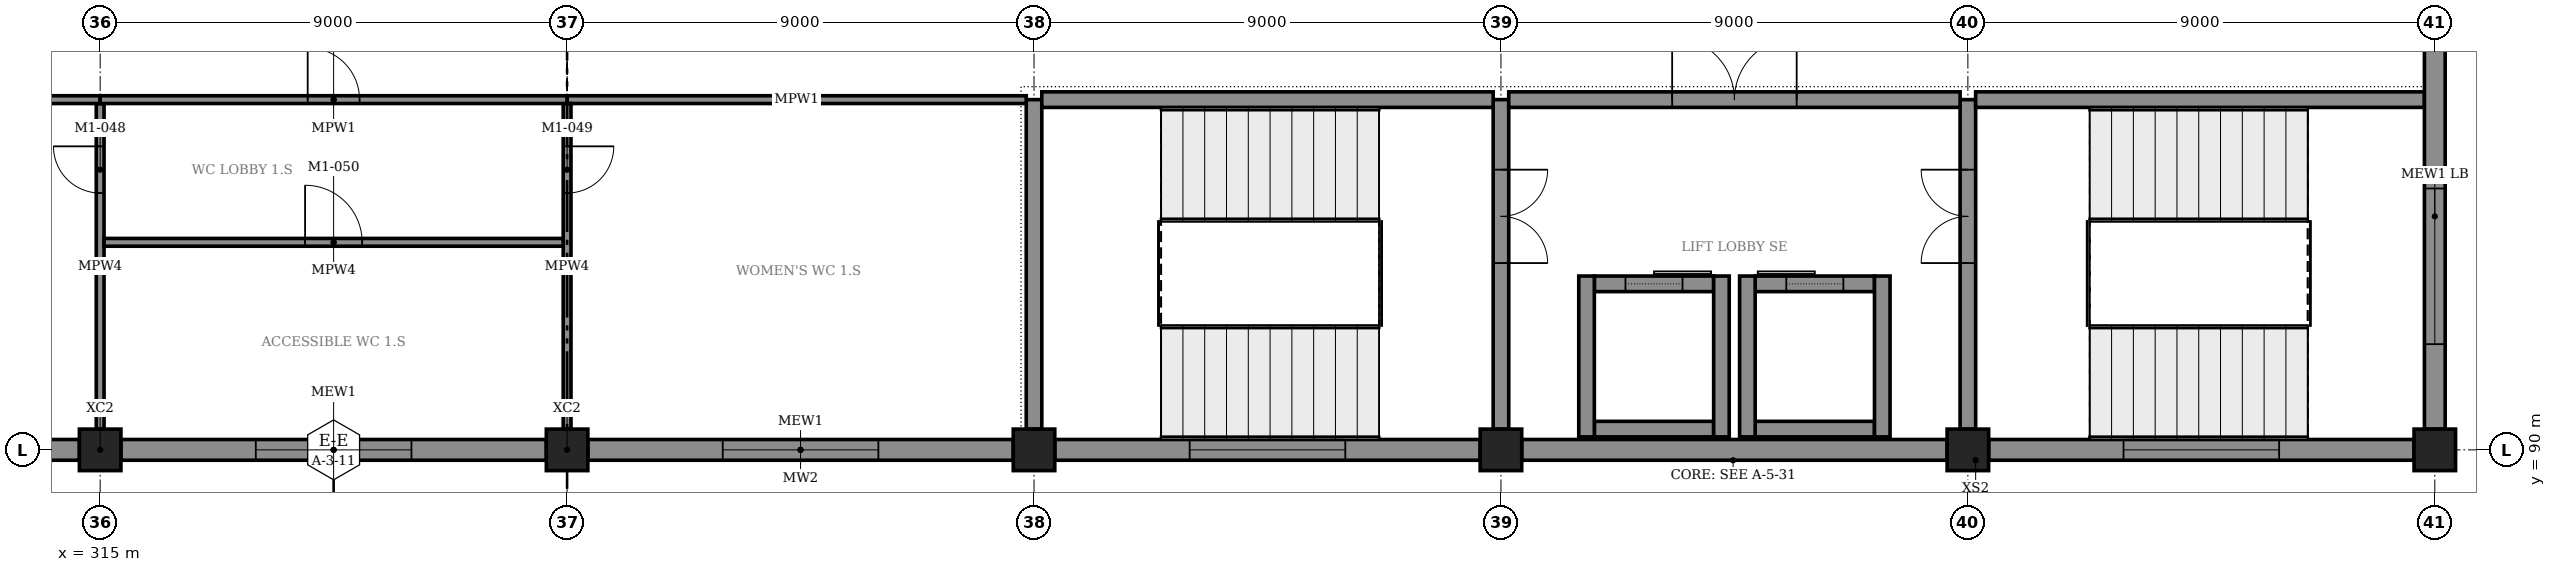
"""IFC4 building model, lengths in metres.
Left out: names, types, materials, properties, quantities, classifications, styles, units other than length and angle.
Written with IfcOpenShell. Run it as: python <this file> out.ifc"""

import sys

from ifc_helpers import new_model, si_unit, direction, frame, frame_2d, origin, origin_2d, place, context, subcontext, project, spatial, rectangle, extrude, element, fill, save


model = new_model("IFC4")
c1 = context("Model", 3, precision=1e-05, world=origin(), true_north=direction((0.0, 1.0)))
c2 = subcontext(c1, "Body", "Model", "MODEL_VIEW")
j1 = project(units=[si_unit("LENGTHUNIT", "METRE"), si_unit("PLANEANGLEUNIT", "RADIAN")], contexts=[c1])
p1 = place(None, origin())
s1 = spatial("IfcSite", under=j1, at=p1, CompositionType="ELEMENT")
p2 = place(p1, origin())
s2 = spatial("IfcBuilding", under=s1, at=p2, CompositionType="ELEMENT")
p3 = place(p2, frame((0.0, 0.0, 6.0)))
s3 = spatial("IfcBuildingStorey", under=s2, at=p3, CompositionType="ELEMENT", Elevation=6.0)
for number, where, z_axis, x_axis in (
    (1, (315.0, 90.0, 0.0), (0.0, 0.0, 1.0), (1.0, 0.0, 0.0)),
    (2, (324.0, 90.0, 0.0), (0.0, 0.0, 1.0), (1.0, 0.0, 0.0)),
    (3, (333.0, 90.0, 0.0), (0.0, 0.0, 1.0), (1.0, 0.0, 0.0)),
    (4, (342.0, 90.0, 0.0), (0.0, 0.0, 1.0), (1.0, 0.0, 0.0)),
    (5, (351.0, 90.0, 0.0), (0.0, 0.0, 1.0), (1.0, 0.0, 0.0)),
    (6, (360.0, 90.0, 0.0), (0.0, 0.0, 1.0), (1.0, 0.0, 0.0)),
):
    element("IfcColumn", number, at=place(p3, frame(where, z_axis=z_axis, x_axis=x_axis)), inside=s3, PredefinedType="COLUMN", context=c2, shape_type="SweptSolid", body=[
        extrude(rectangle(XDim=0.8, YDim=0.8, at=origin_2d()), origin(), (0.0, 0.0, 1.0), 5.5),
    ])
p4 = place(p3, frame((306.4, 90.0, 0.0), z_axis=(0.0, 0.0, 1.0), x_axis=(1.0, 0.0, 0.0)))
e7 = element("IfcWall", 7, at=p4, inside=s3, PredefinedType="STANDARD", context=c2, shape_type="SweptSolid", body=[
    extrude(rectangle(XDim=8.2, YDim=0.4, at=frame_2d((4.1, 0.0))), origin(), (0.0, 0.0, 1.0), 4.32),
])
p5 = place(p4, frame((2.6, 0.0, 0.9)))
e8 = element("IfcOpeningElement", 8, at=p5, cuts=e7, PredefinedType="OPENING", context=c2, shape_type="SweptSolid", body=[
    extrude(rectangle(XDim=3.0, YDim=2.1, at=frame_2d((1.5, 1.05))), frame((0.0, 0.21, 0.0), z_axis=(0.0, -1.0, 0.0), x_axis=(1.0, 0.0, 0.0)), (0.0, 0.0, 1.0), 0.42),
])
p6 = place(p3, frame((315.4, 90.0, 0.0), z_axis=(0.0, 0.0, 1.0), x_axis=(1.0, 0.0, 0.0)))
e9 = element("IfcWall", 9, at=p6, inside=s3, PredefinedType="STANDARD", context=c2, shape_type="SweptSolid", body=[
    extrude(rectangle(XDim=8.2, YDim=0.4, at=frame_2d((4.1, 0.0))), origin(), (0.0, 0.0, 1.0), 4.32),
])
p7 = place(p6, frame((2.6, 0.0, 0.9)))
e10 = element("IfcOpeningElement", 10, at=p7, cuts=e9, PredefinedType="OPENING", context=c2, shape_type="SweptSolid", body=[
    extrude(rectangle(XDim=3.0, YDim=2.1, at=frame_2d((1.5, 1.05))), frame((0.0, 0.21, 0.0), z_axis=(0.0, -1.0, 0.0), x_axis=(1.0, 0.0, 0.0)), (0.0, 0.0, 1.0), 0.42),
])
p8 = place(p3, frame((324.4, 90.0, 0.0), z_axis=(0.0, 0.0, 1.0), x_axis=(1.0, 0.0, 0.0)))
e11 = element("IfcWall", 11, at=p8, inside=s3, PredefinedType="STANDARD", context=c2, shape_type="SweptSolid", body=[
    extrude(rectangle(XDim=8.2, YDim=0.4, at=frame_2d((4.1, 0.0))), origin(), (0.0, 0.0, 1.0), 4.32),
])
p9 = place(p8, frame((2.6, 0.0, 0.9)))
e12 = element("IfcOpeningElement", 12, at=p9, cuts=e11, PredefinedType="OPENING", context=c2, shape_type="SweptSolid", body=[
    extrude(rectangle(XDim=3.0, YDim=2.1, at=frame_2d((1.5, 1.05))), frame((0.0, 0.21, 0.0), z_axis=(0.0, -1.0, 0.0), x_axis=(1.0, 0.0, 0.0)), (0.0, 0.0, 1.0), 0.42),
])
p10 = place(p3, frame((333.4, 90.0, 0.0), z_axis=(0.0, 0.0, 1.0), x_axis=(1.0, 0.0, 0.0)))
e13 = element("IfcWall", 13, at=p10, inside=s3, PredefinedType="STANDARD", context=c2, shape_type="SweptSolid", body=[
    extrude(rectangle(XDim=8.2, YDim=0.4, at=frame_2d((4.1, 0.0))), origin(), (0.0, 0.0, 1.0), 4.32),
])
p11 = place(p10, frame((2.6, 0.0, 0.9)))
e14 = element("IfcOpeningElement", 14, at=p11, cuts=e13, PredefinedType="OPENING", context=c2, shape_type="SweptSolid", body=[
    extrude(rectangle(XDim=3.0, YDim=2.1, at=frame_2d((1.5, 1.05))), frame((0.0, 0.21, 0.0), z_axis=(0.0, -1.0, 0.0), x_axis=(1.0, 0.0, 0.0)), (0.0, 0.0, 1.0), 0.42),
])
p12 = place(p3, frame((342.4, 90.0, 0.0), z_axis=(0.0, 0.0, 1.0), x_axis=(1.0, 0.0, 0.0)))
e15 = element("IfcWall", 15, at=p12, inside=s3, PredefinedType="STANDARD", context=c2, shape_type="SweptSolid", body=[
    extrude(rectangle(XDim=8.2, YDim=0.4, at=frame_2d((4.1, 0.0))), origin(), (0.0, 0.0, 1.0), 4.32),
])
p13 = place(p3, frame((351.4, 90.0, 0.0), z_axis=(0.0, 0.0, 1.0), x_axis=(1.0, 0.0, 0.0)))
e16 = element("IfcWall", 16, at=p13, inside=s3, PredefinedType="STANDARD", context=c2, shape_type="SweptSolid", body=[
    extrude(rectangle(XDim=8.2, YDim=0.4, at=frame_2d((4.1, 0.0))), origin(), (0.0, 0.0, 1.0), 4.32),
])
p14 = place(p13, frame((2.6, 0.0, 0.9)))
e17 = element("IfcOpeningElement", 17, at=p14, cuts=e16, PredefinedType="OPENING", context=c2, shape_type="SweptSolid", body=[
    extrude(rectangle(XDim=3.0, YDim=2.1, at=frame_2d((1.5, 1.05))), frame((0.0, 0.21, 0.0), z_axis=(0.0, -1.0, 0.0), x_axis=(1.0, 0.0, 0.0)), (0.0, 0.0, 1.0), 0.42),
])
p15 = place(p3, frame((360.0, 90.4, 0.0), z_axis=(0.0, 0.0, 1.0), x_axis=(0.0, 1.0, 0.0)))
e18 = element("IfcWall", 18, at=p15, inside=s3, PredefinedType="STANDARD", context=c2, shape_type="SweptSolid", body=[
    extrude(rectangle(XDim=8.2, YDim=0.4, at=frame_2d((4.1, 0.0))), origin(), (0.0, 0.0, 1.0), 4.32),
])
p16 = place(p15, frame((1.638, 0.0, 0.9)))
e19 = element("IfcOpeningElement", 19, at=p16, cuts=e18, PredefinedType="OPENING", context=c2, shape_type="SweptSolid", body=[
    extrude(rectangle(XDim=3.0, YDim=2.1, at=frame_2d((1.5, 1.05))), frame((0.0, 0.21, 0.0), z_axis=(0.0, -1.0, 0.0), x_axis=(1.0, 0.0, 0.0)), (0.0, 0.0, 1.0), 0.42),
])
p17 = place(p3, frame((351.0, 90.4, 0.0), z_axis=(0.0, 0.0, 1.0), x_axis=(0.0, 1.0, 0.0)))
e20 = element("IfcWall", 20, at=p17, inside=s3, PredefinedType="SHEAR", context=c2, shape_type="SweptSolid", body=[
    extrude(rectangle(XDim=6.35, YDim=0.3, at=frame_2d((3.175, 0.0))), origin(), (0.0, 0.0, 1.0), 5.22),
])
p18 = place(p17, frame((3.2, 0.0, 0.0)))
e21 = element("IfcOpeningElement", 21, at=p18, cuts=e20, PredefinedType="OPENING", context=c2, shape_type="SweptSolid", body=[
    extrude(rectangle(XDim=1.8, YDim=2.4, at=frame_2d((0.9, 1.2))), frame((0.0, 0.16, 0.0), z_axis=(0.0, -1.0, 0.0), x_axis=(1.0, 0.0, 0.0)), (0.0, 0.0, 1.0), 0.32),
])
p19 = place(p3, frame((342.0, 90.4, 0.0), z_axis=(0.0, 0.0, 1.0), x_axis=(0.0, 1.0, 0.0)))
e22 = element("IfcWall", 22, at=p19, inside=s3, PredefinedType="SHEAR", context=c2, shape_type="SweptSolid", body=[
    extrude(rectangle(XDim=6.35, YDim=0.3, at=frame_2d((3.175, 0.0))), origin(), (0.0, 0.0, 1.0), 5.22),
])
p20 = place(p19, frame((3.2, 0.0, 0.0)))
e23 = element("IfcOpeningElement", 23, at=p20, cuts=e22, PredefinedType="OPENING", context=c2, shape_type="SweptSolid", body=[
    extrude(rectangle(XDim=1.8, YDim=2.4, at=frame_2d((0.9, 1.2))), frame((0.0, 0.16, 0.0), z_axis=(0.0, -1.0, 0.0), x_axis=(1.0, 0.0, 0.0)), (0.0, 0.0, 1.0), 0.32),
])
p21 = place(p3, frame((333.0, 90.4, 0.0), z_axis=(0.0, 0.0, 1.0), x_axis=(0.0, 1.0, 0.0)))
e24 = element("IfcWall", 24, at=p21, inside=s3, PredefinedType="SHEAR", context=c2, shape_type="SweptSolid", body=[
    extrude(rectangle(XDim=6.35, YDim=0.3, at=frame_2d((3.175, 0.0))), origin(), (0.0, 0.0, 1.0), 5.22),
])
p22 = place(p3, frame((333.15, 96.75, 0.0), z_axis=(0.0, 0.0, 1.0), x_axis=(1.0, 0.0, 0.0)))
e25 = element("IfcWall", 25, at=p22, inside=s3, PredefinedType="SHEAR", context=c2, shape_type="SweptSolid", body=[
    extrude(rectangle(XDim=8.7, YDim=0.3, at=frame_2d((4.35, 0.0))), origin(), (0.0, 0.0, 1.0), 5.22),
])
p23 = place(p3, frame((342.15, 96.75, 0.0), z_axis=(0.0, 0.0, 1.0), x_axis=(1.0, 0.0, 0.0)))
e26 = element("IfcWall", 26, at=p23, inside=s3, PredefinedType="SHEAR", context=c2, shape_type="SweptSolid", body=[
    extrude(rectangle(XDim=8.7, YDim=0.3, at=frame_2d((4.35, 0.0))), origin(), (0.0, 0.0, 1.0), 5.22),
])
p24 = place(p23, frame((3.15, 0.0, 0.0)))
e27 = element("IfcOpeningElement", 27, at=p24, cuts=e26, PredefinedType="OPENING", context=c2, shape_type="SweptSolid", body=[
    extrude(rectangle(XDim=2.4, YDim=2.4, at=frame_2d((1.2, 1.2))), frame((0.0, 0.16, 0.0), z_axis=(0.0, -1.0, 0.0), x_axis=(1.0, 0.0, 0.0)), (0.0, 0.0, 1.0), 0.32),
])
p25 = place(p3, frame((351.15, 96.75, 0.0), z_axis=(0.0, 0.0, 1.0), x_axis=(1.0, 0.0, 0.0)))
e28 = element("IfcWall", 28, at=p25, inside=s3, PredefinedType="SHEAR", context=c2, shape_type="SweptSolid", body=[
    extrude(rectangle(XDim=8.65, YDim=0.3, at=frame_2d((4.325, 0.0))), origin(), (0.0, 0.0, 1.0), 5.22),
])
for number, where, z_axis, x_axis in (
    (29, (349.35, 90.25, 0.0), (0.0, 0.0, 1.0), (0.0, 1.0, 0.0)),
    (30, (346.75, 90.25, 0.0), (0.0, 0.0, 1.0), (0.0, 1.0, 0.0)),
):
    element("IfcWall", number, at=place(p3, frame(where, z_axis=z_axis, x_axis=x_axis)), inside=s3, PredefinedType="SHEAR", context=c2, shape_type="SweptSolid", body=[
        extrude(rectangle(XDim=3.1, YDim=0.3, at=frame_2d((1.55, 0.0))), origin(), (0.0, 0.0, 1.0), 5.5),
    ])
p26 = place(p3, frame((346.9, 90.4, 0.0), z_axis=(0.0, 0.0, 1.0), x_axis=(1.0, 0.0, 0.0)))
e31 = element("IfcWall", 31, at=p26, inside=s3, PredefinedType="SHEAR", context=c2, shape_type="SweptSolid", body=[
    extrude(rectangle(XDim=2.3, YDim=0.3, at=frame_2d((1.15, 0.0))), origin(), (0.0, 0.0, 1.0), 5.5),
])
p27 = place(p3, frame((346.9, 93.2, 0.0), z_axis=(0.0, 0.0, 1.0), x_axis=(1.0, 0.0, 0.0)))
e32 = element("IfcWall", 32, at=p27, inside=s3, PredefinedType="SHEAR", context=c2, shape_type="SweptSolid", body=[
    extrude(rectangle(XDim=2.3, YDim=0.3, at=frame_2d((1.15, 0.0))), origin(), (0.0, 0.0, 1.0), 5.5),
])
p28 = place(p27, frame((0.6, 0.0, 0.0)))
e33 = element("IfcOpeningElement", 33, at=p28, cuts=e32, PredefinedType="OPENING", context=c2, shape_type="SweptSolid", body=[
    extrude(rectangle(XDim=1.1, YDim=2.2, at=frame_2d((0.55, 1.1))), frame((0.0, 0.16, 0.0), z_axis=(0.0, -1.0, 0.0), x_axis=(1.0, 0.0, 0.0)), (0.0, 0.0, 1.0), 0.32),
])
for number, where, z_axis, x_axis in (
    (34, (346.25, 90.25, 0.0), (0.0, 0.0, 1.0), (0.0, 1.0, 0.0)),
    (35, (343.65, 90.25, 0.0), (0.0, 0.0, 1.0), (0.0, 1.0, 0.0)),
):
    element("IfcWall", number, at=place(p3, frame(where, z_axis=z_axis, x_axis=x_axis)), inside=s3, PredefinedType="SHEAR", context=c2, shape_type="SweptSolid", body=[
        extrude(rectangle(XDim=3.1, YDim=0.3, at=frame_2d((1.55, 0.0))), origin(), (0.0, 0.0, 1.0), 5.5),
    ])
p29 = place(p3, frame((343.8, 90.4, 0.0), z_axis=(0.0, 0.0, 1.0), x_axis=(1.0, 0.0, 0.0)))
e36 = element("IfcWall", 36, at=p29, inside=s3, PredefinedType="SHEAR", context=c2, shape_type="SweptSolid", body=[
    extrude(rectangle(XDim=2.3, YDim=0.3, at=frame_2d((1.15, 0.0))), origin(), (0.0, 0.0, 1.0), 5.5),
])
p30 = place(p3, frame((343.8, 93.2, 0.0), z_axis=(0.0, 0.0, 1.0), x_axis=(1.0, 0.0, 0.0)))
e37 = element("IfcWall", 37, at=p30, inside=s3, PredefinedType="SHEAR", context=c2, shape_type="SweptSolid", body=[
    extrude(rectangle(XDim=2.3, YDim=0.3, at=frame_2d((1.15, 0.0))), origin(), (0.0, 0.0, 1.0), 5.5),
])
p31 = place(p30, frame((0.6, 0.0, 0.0)))
e38 = element("IfcOpeningElement", 38, at=p31, cuts=e37, PredefinedType="OPENING", context=c2, shape_type="SweptSolid", body=[
    extrude(rectangle(XDim=1.1, YDim=2.2, at=frame_2d((0.55, 1.1))), frame((0.0, 0.16, 0.0), z_axis=(0.0, -1.0, 0.0), x_axis=(1.0, 0.0, 0.0)), (0.0, 0.0, 1.0), 0.32),
])
p32 = place(p3, frame((306.15, 96.75, 0.0), z_axis=(0.0, 0.0, 1.0), x_axis=(1.0, 0.0, 0.0)))
e39 = element("IfcWall", 39, at=p32, inside=s3, PredefinedType="PARTITIONING", context=c2, shape_type="SweptSolid", body=[
    extrude(rectangle(XDim=8.85, YDim=0.15, at=frame_2d((4.425, 0.0))), origin(), (0.0, 0.0, 1.0), 4.32),
])
p33 = place(p3, frame((315.0, 90.4, 0.0), z_axis=(0.0, 0.0, 1.0), x_axis=(0.0, 1.0, 0.0)))
e40 = element("IfcWall", 40, at=p33, inside=s3, PredefinedType="PARTITIONING", context=c2, shape_type="SweptSolid", body=[
    extrude(rectangle(XDim=6.275, YDim=0.15, at=frame_2d((3.138, 0.0))), origin(), (0.0, 0.0, 1.0), 4.32),
])
p34 = place(p33, frame((4.55, 0.0, 0.0)))
e41 = element("IfcOpeningElement", 41, at=p34, cuts=e40, PredefinedType="OPENING", context=c2, shape_type="SweptSolid", body=[
    extrude(rectangle(XDim=0.9, YDim=2.1, at=frame_2d((0.45, 1.05))), frame((0.0, 0.085, 0.0), z_axis=(0.0, -1.0, 0.0), x_axis=(1.0, 0.0, 0.0)), (0.0, 0.0, 1.0), 0.17),
])
p35 = place(p3, frame((324.0, 96.75, 0.0), z_axis=(0.0, 0.0, 1.0), x_axis=(1.0, 0.0, 0.0)))
e42 = element("IfcWall", 42, at=p35, inside=s3, PredefinedType="PARTITIONING", context=c2, shape_type="SweptSolid", body=[
    extrude(rectangle(XDim=8.85, YDim=0.15, at=frame_2d((4.425, 0.0))), origin(), (0.0, 0.0, 1.0), 4.32),
])
p36 = place(p3, frame((324.0, 90.4, 0.0), z_axis=(0.0, 0.0, 1.0), x_axis=(0.0, 1.0, 0.0)))
e43 = element("IfcWall", 43, at=p36, inside=s3, PredefinedType="PARTITIONING", context=c2, shape_type="SweptSolid", body=[
    extrude(rectangle(XDim=6.275, YDim=0.15, at=frame_2d((3.138, 0.0))), origin(), (0.0, 0.0, 1.0), 4.32),
])
p37 = place(p36, frame((4.55, 0.0, 0.0)))
e44 = element("IfcOpeningElement", 44, at=p37, cuts=e43, PredefinedType="OPENING", context=c2, shape_type="SweptSolid", body=[
    extrude(rectangle(XDim=0.9, YDim=2.1, at=frame_2d((0.45, 1.05))), frame((0.0, 0.085, 0.0), z_axis=(0.0, -1.0, 0.0), x_axis=(1.0, 0.0, 0.0)), (0.0, 0.0, 1.0), 0.17),
])
p38 = place(p3, frame((315.075, 94.0, 0.0), z_axis=(0.0, 0.0, 1.0), x_axis=(1.0, 0.0, 0.0)))
e45 = element("IfcWall", 45, at=p38, inside=s3, PredefinedType="PARTITIONING", context=c2, shape_type="SweptSolid", body=[
    extrude(rectangle(XDim=8.85, YDim=0.15, at=frame_2d((4.425, 0.0))), origin(), (0.0, 0.0, 1.0), 4.32),
])
p39 = place(p38, frame((3.875, 0.0, 0.0)))
e46 = element("IfcOpeningElement", 46, at=p39, cuts=e45, PredefinedType="OPENING", context=c2, shape_type="SweptSolid", body=[
    extrude(rectangle(XDim=1.1, YDim=2.1, at=frame_2d((0.55, 1.05))), frame((0.0, 0.085, 0.0), z_axis=(0.0, -1.0, 0.0), x_axis=(1.0, 0.0, 0.0)), (0.0, 0.0, 1.0), 0.17),
])
p40 = place(p3, frame((315.0, 96.75, 0.0), z_axis=(0.0, 0.0, 1.0), x_axis=(1.0, 0.0, 0.0)))
e47 = element("IfcWall", 47, at=p40, inside=s3, PredefinedType="PARTITIONING", context=c2, shape_type="SweptSolid", body=[
    extrude(rectangle(XDim=9.0, YDim=0.15, at=frame_2d((4.5, 0.0))), origin(), (0.0, 0.0, 1.0), 4.32),
])
p41 = place(p40, frame((4.0, 0.0, 0.0)))
e48 = element("IfcOpeningElement", 48, at=p41, cuts=e47, PredefinedType="OPENING", context=c2, shape_type="SweptSolid", body=[
    extrude(rectangle(XDim=1.0, YDim=2.4, at=frame_2d((0.5, 1.2))), frame((0.0, 0.085, 0.0), z_axis=(0.0, -1.0, 0.0), x_axis=(1.0, 0.0, 0.0)), (0.0, 0.0, 1.0), 0.17),
])
p42 = place(p7, origin())
e49 = element("IfcWindow", 49, at=p42, inside=s3, PartitioningType="TRIPLE_PANEL_VERTICAL", PredefinedType="WINDOW", context=c2, shape_type="SweptSolid", body=[
    extrude(rectangle(XDim=3.0, YDim=2.1, at=frame_2d((1.5, 1.05))), frame((0.0, 0.03, 0.0), z_axis=(0.0, -1.0, 0.0), x_axis=(1.0, 0.0, 0.0)), (0.0, 0.0, 1.0), 0.06),
])
fill(e10, e49)
p43 = place(p9, origin())
e50 = element("IfcWindow", 50, at=p43, inside=s3, PartitioningType="TRIPLE_PANEL_VERTICAL", PredefinedType="WINDOW", context=c2, shape_type="SweptSolid", body=[
    extrude(rectangle(XDim=3.0, YDim=2.1, at=frame_2d((1.5, 1.05))), frame((0.0, 0.03, 0.0), z_axis=(0.0, -1.0, 0.0), x_axis=(1.0, 0.0, 0.0)), (0.0, 0.0, 1.0), 0.06),
])
fill(e12, e50)
p44 = place(p11, origin())
e51 = element("IfcWindow", 51, at=p44, inside=s3, PartitioningType="TRIPLE_PANEL_VERTICAL", PredefinedType="WINDOW", context=c2, shape_type="SweptSolid", body=[
    extrude(rectangle(XDim=3.0, YDim=2.1, at=frame_2d((1.5, 1.05))), frame((0.0, 0.03, 0.0), z_axis=(0.0, -1.0, 0.0), x_axis=(1.0, 0.0, 0.0)), (0.0, 0.0, 1.0), 0.06),
])
fill(e14, e51)
p45 = place(p14, origin())
e52 = element("IfcWindow", 52, at=p45, inside=s3, PartitioningType="TRIPLE_PANEL_VERTICAL", PredefinedType="WINDOW", context=c2, shape_type="SweptSolid", body=[
    extrude(rectangle(XDim=3.0, YDim=2.1, at=frame_2d((1.5, 1.05))), frame((0.0, 0.03, 0.0), z_axis=(0.0, -1.0, 0.0), x_axis=(1.0, 0.0, 0.0)), (0.0, 0.0, 1.0), 0.06),
])
fill(e17, e52)
p46 = place(p16, origin())
e53 = element("IfcWindow", 53, at=p46, inside=s3, PartitioningType="TRIPLE_PANEL_VERTICAL", PredefinedType="WINDOW", context=c2, shape_type="SweptSolid", body=[
    extrude(rectangle(XDim=3.0, YDim=2.1, at=frame_2d((1.5, 1.05))), frame((0.0, 0.03, 0.0), z_axis=(0.0, -1.0, 0.0), x_axis=(1.0, 0.0, 0.0)), (0.0, 0.0, 1.0), 0.06),
])
fill(e19, e53)
p47 = place(p18, origin())
e54 = element("IfcDoor", 54, at=p47, inside=s3, OperationType="DOUBLE_DOOR_SINGLE_SWING", PredefinedType="DOOR", context=c2, shape_type="SweptSolid", body=[
    extrude(rectangle(XDim=1.8, YDim=2.4, at=frame_2d((0.9, 1.2))), frame((0.0, 0.025, 0.0), z_axis=(0.0, -1.0, 0.0), x_axis=(1.0, 0.0, 0.0)), (0.0, 0.0, 1.0), 0.05),
])
fill(e21, e54)
p48 = place(p20, frame((1.8, 0.0, 0.0), z_axis=(0.0, 0.0, 1.0), x_axis=(-1.0, 0.0, 0.0)))
e55 = element("IfcDoor", 55, at=p48, inside=s3, OperationType="DOUBLE_DOOR_SINGLE_SWING", PredefinedType="DOOR", context=c2, shape_type="SweptSolid", body=[
    extrude(rectangle(XDim=1.8, YDim=2.4, at=frame_2d((0.9, 1.2))), frame((0.0, 0.025, 0.0), z_axis=(0.0, -1.0, 0.0), x_axis=(1.0, 0.0, 0.0)), (0.0, 0.0, 1.0), 0.05),
])
fill(e23, e55)
p49 = place(p24, origin())
e56 = element("IfcDoor", 56, at=p49, inside=s3, OperationType="DOUBLE_DOOR_SINGLE_SWING", PredefinedType="DOOR", context=c2, shape_type="SweptSolid", body=[
    extrude(rectangle(XDim=2.4, YDim=2.4, at=frame_2d((1.2, 1.2))), frame((0.0, 0.025, 0.0), z_axis=(0.0, -1.0, 0.0), x_axis=(1.0, 0.0, 0.0)), (0.0, 0.0, 1.0), 0.05),
])
fill(e27, e56)
p50 = place(p28, origin())
e57 = element("IfcDoor", 57, at=p50, inside=s3, OperationType="SLIDING_TO_LEFT", PredefinedType="DOOR", context=c2, shape_type="SweptSolid", body=[
    extrude(rectangle(XDim=1.1, YDim=2.2, at=frame_2d((0.55, 1.1))), frame((0.0, 0.025, 0.0), z_axis=(0.0, -1.0, 0.0), x_axis=(1.0, 0.0, 0.0)), (0.0, 0.0, 1.0), 0.05),
])
fill(e33, e57)
p51 = place(p31, origin())
e58 = element("IfcDoor", 58, at=p51, inside=s3, OperationType="SLIDING_TO_RIGHT", PredefinedType="DOOR", context=c2, shape_type="SweptSolid", body=[
    extrude(rectangle(XDim=1.1, YDim=2.2, at=frame_2d((0.55, 1.1))), frame((0.0, 0.025, 0.0), z_axis=(0.0, -1.0, 0.0), x_axis=(1.0, 0.0, 0.0)), (0.0, 0.0, 1.0), 0.05),
])
fill(e38, e58)
p52 = place(p34, origin())
e59 = element("IfcDoor", 59, at=p52, inside=s3, OperationType="SINGLE_SWING_RIGHT", PredefinedType="DOOR", context=c2, shape_type="SweptSolid", body=[
    extrude(rectangle(XDim=0.9, YDim=2.1, at=frame_2d((0.45, 1.05))), frame((0.0, 0.025, 0.0), z_axis=(0.0, -1.0, 0.0), x_axis=(1.0, 0.0, 0.0)), (0.0, 0.0, 1.0), 0.05),
])
fill(e41, e59)
p53 = place(p37, frame((0.9, 0.0, 0.0), z_axis=(0.0, 0.0, 1.0), x_axis=(-1.0, 0.0, 0.0)))
e60 = element("IfcDoor", 60, at=p53, inside=s3, OperationType="SINGLE_SWING_RIGHT", PredefinedType="DOOR", context=c2, shape_type="SweptSolid", body=[
    extrude(rectangle(XDim=0.9, YDim=2.1, at=frame_2d((0.45, 1.05))), frame((0.0, 0.025, 0.0), z_axis=(0.0, -1.0, 0.0), x_axis=(1.0, 0.0, 0.0)), (0.0, 0.0, 1.0), 0.05),
])
fill(e44, e60)
p54 = place(p39, origin())
e61 = element("IfcDoor", 61, at=p54, inside=s3, OperationType="SINGLE_SWING_LEFT", PredefinedType="DOOR", context=c2, shape_type="SweptSolid", body=[
    extrude(rectangle(XDim=1.1, YDim=2.1, at=frame_2d((0.55, 1.05))), frame((0.0, 0.025, 0.0), z_axis=(0.0, -1.0, 0.0), x_axis=(1.0, 0.0, 0.0)), (0.0, 0.0, 1.0), 0.05),
])
fill(e46, e61)
p55 = place(p41, origin())
e62 = element("IfcDoor", 62, at=p55, inside=s3, OperationType="SINGLE_SWING_LEFT", PredefinedType="DOOR", context=c2, shape_type="SweptSolid", body=[
    extrude(rectangle(XDim=1.0, YDim=2.4, at=frame_2d((0.5, 1.2))), frame((0.0, 0.025, 0.0), z_axis=(0.0, -1.0, 0.0), x_axis=(1.0, 0.0, 0.0)), (0.0, 0.0, 1.0), 0.05),
])
fill(e48, e62)
save(model, sys.argv[1])
